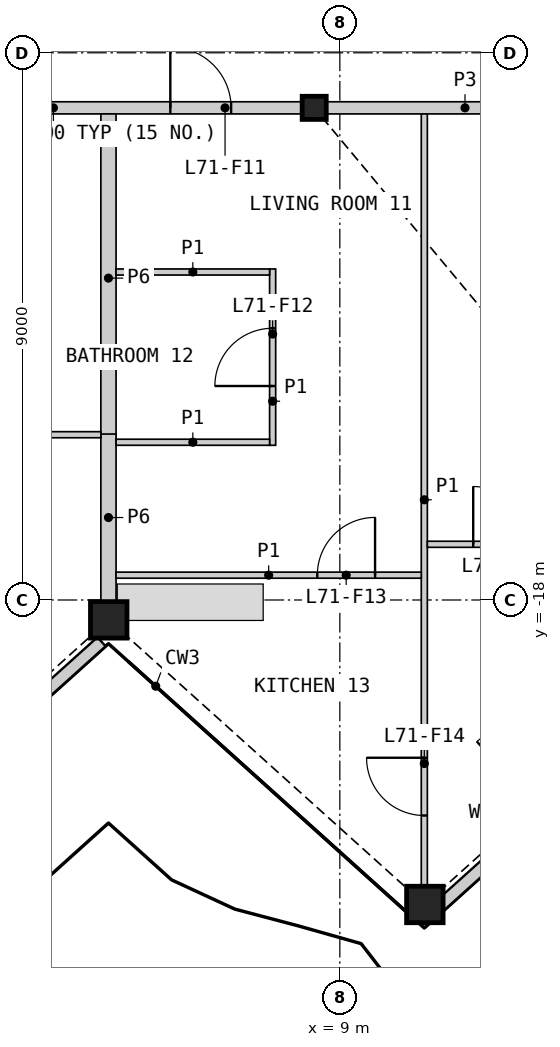
"""IFC4 building model, lengths in metres.
Left out: names, types, materials, properties, quantities, classifications, styles, units other than length and angle.
Written with IfcOpenShell. Run it as: python <this file> out.ifc"""

import sys

from ifc_helpers import new_model, si_unit, direction, frame, frame_2d, origin, origin_2d, place, context, subcontext, project, spatial, rectangle, hollow_rectangle, i_section, extrude, element, fill, save


model = new_model("IFC4")
c1 = context("Model", 3, precision=1e-05, world=origin(), true_north=direction((0.0, 1.0)))
c2 = subcontext(c1, "Body", "Model", "MODEL_VIEW")
j1 = project(units=[si_unit("LENGTHUNIT", "METRE"), si_unit("PLANEANGLEUNIT", "RADIAN")], contexts=[c1])
p1 = place(None, origin())
s1 = spatial("IfcSite", under=j1, at=p1, CompositionType="ELEMENT")
p2 = place(p1, origin())
s2 = spatial("IfcBuilding", under=s1, at=p2, CompositionType="ELEMENT")
p3 = place(p2, frame((0.0, 0.0, 322.2)))
s3 = spatial("IfcBuildingStorey", under=s2, at=p3, CompositionType="ELEMENT", Elevation=322.2)
for number, where, z_axis, x_axis in (
    (1, (5.199, -18.327, 0.0), (0.0, 0.0, 1.0), (1.0, 0.0, 0.0)),
    (2, (10.398, -23.008, 0.0), (0.0, 0.0, 1.0), (1.0, 0.0, 0.0)),
):
    element("IfcColumn", number, at=place(p3, frame(where, z_axis=z_axis, x_axis=x_axis)), inside=s3, PredefinedType="COLUMN", context=c2, shape_type="SweptSolid", body=[
        extrude(hollow_rectangle(XDim=0.6, YDim=0.6, WallThickness=0.04, at=origin_2d()), origin(), (0.0, 0.0, 1.0), 3.4),
    ])
p4 = place(p3, frame((8.578, -9.906, 0.0), z_axis=(0.0, 0.0, 1.0), x_axis=(1.0, 0.0, 0.0)))
e3 = element("IfcColumn", 3, at=p4, inside=s3, PredefinedType="COLUMN", context=c2, shape_type="SweptSolid", body=[
    extrude(i_section(OverallWidth=0.396, OverallDepth=0.381, WebThickness=0.019, FlangeThickness=0.03, at=origin_2d()), origin(), (0.0, 0.0, 1.0), 3.4),
])
p5 = place(p3, frame((0.256, -23.031, 0.0), z_axis=(0.0, 0.0, 1.0), x_axis=(0.743138937876, 0.669137145145, 0.0)))
e4 = element("IfcWall", 4, at=p5, inside=s3, PredefinedType="SOLIDWALL", context=c2, shape_type="SweptSolid", body=[
    extrude(rectangle(XDim=6.493, YDim=0.2, at=frame_2d((3.246, 0.0))), origin(), (0.0, 0.0, 1.0), 2.488),
])
p6 = place(p5, frame((2.261, 0.0, 0.0)))
e5 = element("IfcOpeningElement", 5, at=p6, cuts=e4, PredefinedType="OPENING", context=c2, shape_type="SweptSolid", body=[
    extrude(rectangle(XDim=1.6, YDim=2.25, at=frame_2d((0.8, 1.125))), frame((0.0, 0.11, 0.0), z_axis=(0.0, -1.0, 0.0), x_axis=(1.0, 0.0, 0.0)), (0.0, 0.0, 1.0), 0.22),
])
p7 = place(p3, frame((10.645, -23.031, 0.0), z_axis=(0.0, 0.0, 1.0), x_axis=(0.743138937876, 0.669137145145, 0.0)))
e6 = element("IfcWall", 6, at=p7, inside=s3, PredefinedType="SOLIDWALL", context=c2, shape_type="SweptSolid", body=[
    extrude(rectangle(XDim=6.493, YDim=0.2, at=frame_2d((3.246, 0.0))), origin(), (0.0, 0.0, 1.0), 2.488),
])
p8 = place(p7, frame((2.261, 0.0, 0.0)))
e7 = element("IfcOpeningElement", 7, at=p8, cuts=e6, PredefinedType="OPENING", context=c2, shape_type="SweptSolid", body=[
    extrude(rectangle(XDim=1.6, YDim=2.25, at=frame_2d((0.8, 1.125))), frame((0.0, 0.11, 0.0), z_axis=(0.0, -1.0, 0.0), x_axis=(1.0, 0.0, 0.0)), (0.0, 0.0, 1.0), 0.22),
])
p9 = place(p3, frame((0.208, -9.906, 0.0), z_axis=(0.0, 0.0, 1.0), x_axis=(1.0, 0.0, 0.0)))
e8 = element("IfcWall", 8, at=p9, inside=s3, PredefinedType="PARTITIONING", context=c2, shape_type="SweptSolid", body=[
    extrude(rectangle(XDim=8.163, YDim=0.2, at=frame_2d((4.082, 0.0))), origin(), (0.0, 0.0, 1.0), 3.1),
])
p10 = place(p9, frame((6.004, 0.0, 0.0)))
e9 = element("IfcOpeningElement", 9, at=p10, cuts=e8, PredefinedType="OPENING", context=c2, shape_type="SweptSolid", body=[
    extrude(rectangle(XDim=1.0, YDim=2.1, at=frame_2d((0.5, 1.05))), frame((0.0, 0.11, 0.0), z_axis=(0.0, -1.0, 0.0), x_axis=(1.0, 0.0, 0.0)), (0.0, 0.0, 1.0), 0.22),
])
p11 = place(p3, frame((5.195, -15.407, 0.0), z_axis=(0.0, 0.0, 1.0), x_axis=(0.0, 1.0, 0.0)))
e10 = element("IfcWall", 10, at=p11, inside=s3, PredefinedType="PARTITIONING", context=c2, shape_type="SweptSolid", body=[
    extrude(rectangle(XDim=5.401, YDim=0.25, at=frame_2d((2.701, 0.0))), origin(), (0.0, 0.0, 1.0), 2.33),
])
p12 = place(p3, frame((8.786, -9.906, 0.0), z_axis=(0.0, 0.0, 1.0), x_axis=(1.0, 0.0, 0.0)))
e11 = element("IfcWall", 11, at=p12, inside=s3, PredefinedType="PARTITIONING", context=c2, shape_type="SweptSolid", body=[
    extrude(rectangle(XDim=4.545, YDim=0.2, at=frame_2d((2.272, 0.0))), origin(), (0.0, 0.0, 1.0), 3.1),
])
p13 = place(p3, frame((5.195, -18.017, 0.0), z_axis=(0.0, 0.0, 1.0), x_axis=(0.0, 1.0, 0.0)))
e12 = element("IfcWall", 12, at=p13, inside=s3, PredefinedType="PARTITIONING", context=c2, shape_type="SweptSolid", body=[
    extrude(rectangle(XDim=2.746, YDim=0.25, at=frame_2d((1.373, 0.0))), origin(), (0.0, 0.0, 1.0), 2.33),
])
p14 = place(p3, frame((10.389, -22.698, 0.0), z_axis=(0.0, 0.0, 1.0), x_axis=(0.0, 1.0, 0.0)))
e13 = element("IfcWall", 13, at=p14, inside=s3, PredefinedType="PARTITIONING", context=c2, shape_type="SweptSolid", body=[
    extrude(rectangle(XDim=12.692, YDim=0.1, at=frame_2d((6.346, 0.0))), origin(), (0.0, 0.0, 1.0), 2.33),
])
p15 = place(p14, frame((1.153, 0.0, 0.0)))
e14 = element("IfcOpeningElement", 14, at=p15, cuts=e13, PredefinedType="OPENING", context=c2, shape_type="SweptSolid", body=[
    extrude(rectangle(XDim=0.95, YDim=2.1, at=frame_2d((0.475, 1.05))), frame((0.0, 0.06, 0.0), z_axis=(0.0, -1.0, 0.0), x_axis=(1.0, 0.0, 0.0)), (0.0, 0.0, 1.0), 0.12),
])
p16 = place(p3, frame((10.439, -17.084, 0.0), z_axis=(0.0, 0.0, 1.0), x_axis=(1.0, 0.0, 0.0)))
e15 = element("IfcWall", 15, at=p16, inside=s3, PredefinedType="PARTITIONING", context=c2, shape_type="SweptSolid", body=[
    extrude(rectangle(XDim=6.693, YDim=0.1, at=frame_2d((3.346, 0.0))), origin(), (0.0, 0.0, 1.0), 2.33),
])
p17 = place(p16, frame((0.754, 0.0, 0.0)))
e16 = element("IfcOpeningElement", 16, at=p17, cuts=e15, PredefinedType="OPENING", context=c2, shape_type="SweptSolid", body=[
    extrude(rectangle(XDim=0.95, YDim=2.1, at=frame_2d((0.475, 1.05))), frame((0.0, 0.06, 0.0), z_axis=(0.0, -1.0, 0.0), x_axis=(1.0, 0.0, 0.0)), (0.0, 0.0, 1.0), 0.12),
])
p18 = place(p3, frame((5.32, -17.592, 0.0), z_axis=(0.0, 0.0, 1.0), x_axis=(1.0, 0.0, 0.0)))
e17 = element("IfcWall", 17, at=p18, inside=s3, PredefinedType="PARTITIONING", context=c2, shape_type="SweptSolid", body=[
    extrude(rectangle(XDim=5.02, YDim=0.1, at=frame_2d((2.51, 0.0))), origin(), (0.0, 0.0, 1.0), 2.33),
])
p19 = place(p18, frame((3.31, 0.0, 0.0)))
e18 = element("IfcOpeningElement", 18, at=p19, cuts=e17, PredefinedType="OPENING", context=c2, shape_type="SweptSolid", body=[
    extrude(rectangle(XDim=0.95, YDim=2.1, at=frame_2d((0.475, 1.05))), frame((0.0, 0.06, 0.0), z_axis=(0.0, -1.0, 0.0), x_axis=(1.0, 0.0, 0.0)), (0.0, 0.0, 1.0), 0.12),
])
p20 = place(p3, frame((0.05, -15.282, 0.0), z_axis=(0.0, 0.0, 1.0), x_axis=(1.0, 0.0, 0.0)))
e19 = element("IfcWall", 19, at=p20, inside=s3, PredefinedType="PARTITIONING", context=c2, shape_type="SweptSolid", body=[
    extrude(rectangle(XDim=5.02, YDim=0.1, at=frame_2d((2.51, 0.0))), origin(), (0.0, 0.0, 1.0), 2.33),
])
p21 = place(p20, frame((0.76, 0.0, 0.0)))
e20 = element("IfcOpeningElement", 20, at=p21, cuts=e19, PredefinedType="OPENING", context=c2, shape_type="SweptSolid", body=[
    extrude(rectangle(XDim=0.95, YDim=2.1, at=frame_2d((0.475, 1.05))), frame((0.0, 0.06, 0.0), z_axis=(0.0, -1.0, 0.0), x_axis=(1.0, 0.0, 0.0)), (0.0, 0.0, 1.0), 0.12),
])
p22 = place(p3, frame((7.895, -15.456, 0.0), z_axis=(0.0, 0.0, 1.0), x_axis=(0.0, 1.0, 0.0)))
e21 = element("IfcWall", 21, at=p22, inside=s3, PredefinedType="PARTITIONING", context=c2, shape_type="SweptSolid", body=[
    extrude(rectangle(XDim=2.9, YDim=0.1, at=frame_2d((1.45, 0.0))), origin(), (0.0, 0.0, 1.0), 2.33),
])
p23 = place(p22, frame((0.975, 0.0, 0.0)))
e22 = element("IfcOpeningElement", 22, at=p23, cuts=e21, PredefinedType="OPENING", context=c2, shape_type="SweptSolid", body=[
    extrude(rectangle(XDim=0.95, YDim=2.1, at=frame_2d((0.475, 1.05))), frame((0.0, 0.06, 0.0), z_axis=(0.0, -1.0, 0.0), x_axis=(1.0, 0.0, 0.0)), (0.0, 0.0, 1.0), 0.12),
])
for number, where, z_axis, x_axis in (
    (23, (5.32, -12.606, 0.0), (0.0, 0.0, 1.0), (1.0, 0.0, 0.0)),
    (24, (5.32, -15.406, 0.0), (0.0, 0.0, 1.0), (1.0, 0.0, 0.0)),
):
    element("IfcWall", number, at=place(p3, frame(where, z_axis=z_axis, x_axis=x_axis)), inside=s3, PredefinedType="PARTITIONING", context=c2, shape_type="SweptSolid", body=[
        extrude(rectangle(XDim=2.525, YDim=0.1, at=frame_2d((1.263, 0.0))), origin(), (0.0, 0.0, 1.0), 2.33),
    ])
p24 = place(p10, origin())
e25 = element("IfcDoor", 25, at=p24, inside=s3, OperationType="SINGLE_SWING_LEFT", PredefinedType="DOOR", context=c2, shape_type="SweptSolid", body=[
    extrude(rectangle(XDim=1.0, YDim=2.1, at=frame_2d((0.5, 1.05))), frame((0.0, 0.025, 0.0), z_axis=(0.0, -1.0, 0.0), x_axis=(1.0, 0.0, 0.0)), (0.0, 0.0, 1.0), 0.05),
])
fill(e9, e25)
p25 = place(p23, origin())
e26 = element("IfcDoor", 26, at=p25, inside=s3, OperationType="SINGLE_SWING_LEFT", PredefinedType="DOOR", context=c2, shape_type="SweptSolid", body=[
    extrude(rectangle(XDim=0.95, YDim=2.1, at=frame_2d((0.475, 1.05))), frame((0.0, 0.025, 0.0), z_axis=(0.0, -1.0, 0.0), x_axis=(1.0, 0.0, 0.0)), (0.0, 0.0, 1.0), 0.05),
])
fill(e22, e26)
p26 = place(p19, origin())
e27 = element("IfcDoor", 27, at=p26, inside=s3, OperationType="SINGLE_SWING_RIGHT", PredefinedType="DOOR", context=c2, shape_type="SweptSolid", body=[
    extrude(rectangle(XDim=0.95, YDim=2.1, at=frame_2d((0.475, 1.05))), frame((0.0, 0.025, 0.0), z_axis=(0.0, -1.0, 0.0), x_axis=(1.0, 0.0, 0.0)), (0.0, 0.0, 1.0), 0.05),
])
fill(e18, e27)
p27 = place(p15, origin())
e28 = element("IfcDoor", 28, at=p27, inside=s3, OperationType="SINGLE_SWING_RIGHT", PredefinedType="DOOR", context=c2, shape_type="SweptSolid", body=[
    extrude(rectangle(XDim=0.95, YDim=2.1, at=frame_2d((0.475, 1.05))), frame((0.0, 0.025, 0.0), z_axis=(0.0, -1.0, 0.0), x_axis=(1.0, 0.0, 0.0)), (0.0, 0.0, 1.0), 0.05),
])
fill(e14, e28)
p28 = place(p17, origin())
e29 = element("IfcDoor", 29, at=p28, inside=s3, OperationType="SINGLE_SWING_LEFT", PredefinedType="DOOR", context=c2, shape_type="SweptSolid", body=[
    extrude(rectangle(XDim=0.95, YDim=2.1, at=frame_2d((0.475, 1.05))), frame((0.0, 0.025, 0.0), z_axis=(0.0, -1.0, 0.0), x_axis=(1.0, 0.0, 0.0)), (0.0, 0.0, 1.0), 0.05),
])
fill(e16, e29)
save(model, sys.argv[1])
